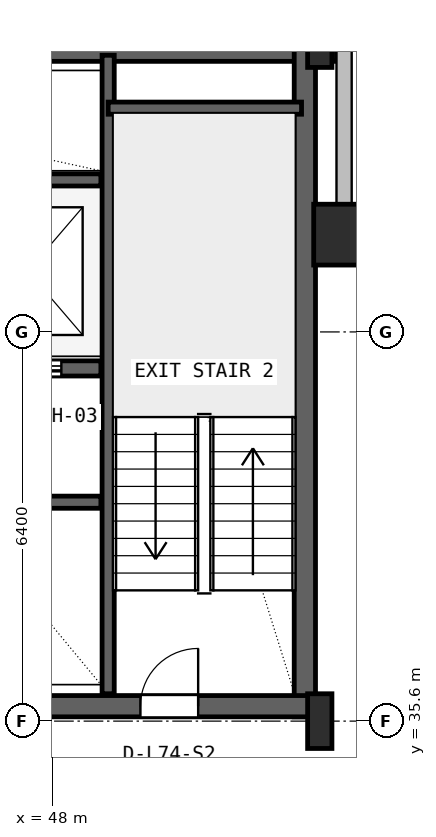
"""IFC4 building model, lengths in metres.
Left out: names, types, materials, properties, quantities, classifications, styles, units other than length and angle.
Written with IfcOpenShell. Run it as: python <this file> out.ifc"""

import sys

from ifc_helpers import new_model, si_unit, direction, frame, frame_2d, origin, origin_2d, place, context, subcontext, project, spatial, rectangle, hollow_rectangle, i_section, extrude, source, transform, mapped, element, fill, save


model = new_model("IFC4")
c1 = context("Model", 3, precision=1e-05, world=origin(), true_north=direction((0.0, 1.0)))
c2 = subcontext(c1, "Body", "Model", "MODEL_VIEW")
j1 = project(units=[si_unit("LENGTHUNIT", "METRE"), si_unit("PLANEANGLEUNIT", "RADIAN")], contexts=[c1])
p1 = place(None, origin())
s1 = spatial("IfcSite", under=j1, at=p1, CompositionType="ELEMENT")
p2 = place(p1, origin())
s2 = spatial("IfcBuilding", under=s1, at=p2, CompositionType="ELEMENT")
p3 = place(p2, frame((0.0, 0.0, 296.4)))
s3 = spatial("IfcBuildingStorey", under=s2, at=p3, CompositionType="ELEMENT", Elevation=296.4)
p4 = place(p3, frame((15.325, 46.625, 0.0), z_axis=(0.0, 0.0, 1.0), x_axis=(1.0, 0.0, 0.0)))
e1 = element("IfcWall", 1, at=p4, inside=s3, PredefinedType="SHEAR", context=c2, shape_type="SweptSolid", body=[
    extrude(rectangle(XDim=37.35, YDim=0.35, at=frame_2d((18.675, 0.0))), origin(), (0.0, 0.0, 1.0), 3.52),
])
p5 = place(p3, frame((52.155, 35.67, 0.0), z_axis=(0.0, 0.0, 1.0), x_axis=(0.0, 1.0, 0.0)))
e2 = element("IfcWall", 2, at=p5, inside=s3, PredefinedType="SHEAR", context=c2, shape_type="SweptSolid", body=[
    extrude(rectangle(XDim=11.13, YDim=0.35, at=frame_2d((5.565, 0.0))), origin(), (0.0, 0.0, 1.0), 3.52),
])
p6 = place(p3, frame((43.2, 35.845, 0.0), z_axis=(0.0, 0.0, 1.0), x_axis=(1.0, 0.0, 0.0)))
e3 = element("IfcWall", 3, at=p6, inside=s3, PredefinedType="SHEAR", context=c2, shape_type="SweptSolid", body=[
    extrude(rectangle(XDim=9.13, YDim=0.35, at=frame_2d((4.565, 0.0))), origin(), (0.0, 0.0, 1.0), 3.52),
])
p7 = place(p6, frame((6.25, 0.0, 0.0)))
e4 = element("IfcOpeningElement", 4, at=p7, cuts=e3, PredefinedType="OPENING", context=c2, shape_type="SweptSolid", body=[
    extrude(rectangle(XDim=0.95, YDim=2.1, at=frame_2d((0.475, 1.05))), frame((0.0, 0.185, 0.0), z_axis=(0.0, -1.0, 0.0), x_axis=(1.0, 0.0, 0.0)), (0.0, 0.0, 1.0), 0.37),
])
m1 = source(origin(), c2, "Body", "SweptSolid", [
    extrude(i_section(OverallWidth=0.4, OverallDepth=0.9, WebThickness=0.016, FlangeThickness=0.028, FilletRadius=0.016, at=origin_2d()), origin(), (0.0, 0.0, 1.0), 3.8),
])
for number, where, z_axis, x_axis in (
    (5, (52.4, 35.6, 0.0), (0.0, 0.0, 1.0), (1.0, 0.0, 0.0)),
    (6, (52.4, 46.8, 0.0), (0.0, 0.0, 1.0), (1.0, 0.0, 0.0)),
):
    element("IfcColumn", number, at=place(p3, frame(where, z_axis=z_axis, x_axis=x_axis)), inside=s3, PredefinedType="COLUMN", context=c2, shape_type="MappedRepresentation", body=[
        mapped(m1, transform((0.0, 0.0, 0.0), x_axis=(1.0, 0.0, 0.0), y_axis=(0.0, 1.0, 0.0), z_axis=(0.0, 0.0, 1.0), scale=1.0)),
    ])
m2 = source(origin(), c2, "Body", "SweptSolid", [
    extrude(hollow_rectangle(XDim=1.0, YDim=1.0, WallThickness=0.04, at=origin_2d()), origin(), (0.0, 0.0, 1.0), 3.8),
])
p8 = place(p3, frame((52.8, 43.6, 0.0), z_axis=(0.0, 0.0, 1.0), x_axis=(1.0, 0.0, 0.0)))
e7 = element("IfcColumn", 7, at=p8, inside=s3, PredefinedType="COLUMN", context=c2, shape_type="MappedRepresentation", body=[
    mapped(m2, transform((0.0, 0.0, 0.0), x_axis=(1.0, 0.0, 0.0), y_axis=(0.0, 1.0, 0.0), z_axis=(0.0, 0.0, 1.0), scale=1.0)),
])
p9 = place(p3, frame((52.93, 43.6, 0.0), z_axis=(0.0, 0.0, 1.0), x_axis=(1.0, 0.0, 0.0)))
e8 = element("IfcWall", 8, at=p9, inside=s3, PredefinedType="SOLIDWALL", context=c2, shape_type="SweptSolid", body=[
    extrude(rectangle(XDim=2.99, YDim=0.25, at=frame_2d((1.495, 0.0))), origin(), (0.0, 0.0, 1.0), 3.5),
])
p10 = place(p3, frame((52.8, 43.52, 0.0), z_axis=(0.0, 0.0, 1.0), x_axis=(0.0, 1.0, 0.0)))
e9 = element("IfcWall", 9, at=p10, inside=s3, PredefinedType="SOLIDWALL", context=c2, shape_type="SweptSolid", body=[
    extrude(rectangle(XDim=3.2, YDim=0.25, at=frame_2d((1.6, 0.0))), origin(), (0.0, 0.0, 1.0), 3.141),
])
p11 = place(p3, frame((48.92, 36.05, 0.0), z_axis=(0.0, 0.0, 1.0), x_axis=(0.0, 1.0, 0.0)))
e10 = element("IfcWall", 10, at=p11, inside=s3, PredefinedType="SHEAR", context=c2, shape_type="SweptSolid", body=[
    extrude(rectangle(XDim=10.5, YDim=0.2, at=frame_2d((5.25, 0.0))), origin(), (0.0, 0.0, 1.0), 3.52),
])
p12 = place(p3, frame((48.92, 45.68, 0.0), z_axis=(0.0, 0.0, 1.0), x_axis=(1.0, 0.0, 0.0)))
e11 = element("IfcWall", 11, at=p12, inside=s3, PredefinedType="SHEAR", context=c2, shape_type="SweptSolid", body=[
    extrude(rectangle(XDim=3.18, YDim=0.2, at=frame_2d((1.59, 0.0))), origin(), (0.0, 0.0, 1.0), 3.52),
])
p13 = place(p3, frame((24.98, 41.4, 0.0), z_axis=(0.0, 0.0, 1.0), x_axis=(1.0, 0.0, 0.0)))
e12 = element("IfcWall", 12, at=p13, inside=s3, PredefinedType="SHEAR", context=c2, shape_type="SweptSolid", body=[
    extrude(rectangle(XDim=23.82, YDim=0.25, at=frame_2d((11.91, 0.0))), origin(), (0.0, 0.0, 1.0), 3.52),
])
p14 = place(p13, frame((16.87, 0.0, 0.0)))
e13 = element("IfcOpeningElement", 13, at=p14, cuts=e12, PredefinedType="OPENING", context=c2, shape_type="SweptSolid", body=[
    extrude(rectangle(XDim=1.1, YDim=2.18, at=frame_2d((0.55, 1.09))), frame((0.0, 0.135, 0.0), z_axis=(0.0, -1.0, 0.0), x_axis=(1.0, 0.0, 0.0)), (0.0, 0.0, 1.0), 0.27),
])
p15 = place(p13, frame((19.47, 0.0, 0.0)))
e14 = element("IfcOpeningElement", 14, at=p15, cuts=e12, PredefinedType="OPENING", context=c2, shape_type="SweptSolid", body=[
    extrude(rectangle(XDim=1.1, YDim=2.18, at=frame_2d((0.55, 1.09))), frame((0.0, 0.135, 0.0), z_axis=(0.0, -1.0, 0.0), x_axis=(1.0, 0.0, 0.0)), (0.0, 0.0, 1.0), 0.27),
])
p16 = place(p13, frame((22.07, 0.0, 0.0)))
e15 = element("IfcOpeningElement", 15, at=p16, cuts=e12, PredefinedType="OPENING", context=c2, shape_type="SweptSolid", body=[
    extrude(rectangle(XDim=1.1, YDim=2.18, at=frame_2d((0.55, 1.09))), frame((0.0, 0.135, 0.0), z_axis=(0.0, -1.0, 0.0), x_axis=(1.0, 0.0, 0.0)), (0.0, 0.0, 1.0), 0.27),
])
p17 = place(p13, frame((1.81, 0.0, 0.0)))
e16 = element("IfcOpeningElement", 16, at=p17, cuts=e12, PredefinedType="OPENING", context=c2, shape_type="SweptSolid", body=[
    extrude(rectangle(XDim=0.92, YDim=2.08, at=frame_2d((0.46, 1.04))), frame((0.0, 0.135, 0.0), z_axis=(0.0, -1.0, 0.0), x_axis=(1.0, 0.0, 0.0)), (0.0, 0.0, 1.0), 0.27),
])
p18 = place(p13, frame((5.71, 0.0, 0.0)))
e17 = element("IfcOpeningElement", 17, at=p18, cuts=e12, PredefinedType="OPENING", context=c2, shape_type="SweptSolid", body=[
    extrude(rectangle(XDim=0.92, YDim=2.08, at=frame_2d((0.46, 1.04))), frame((0.0, 0.135, 0.0), z_axis=(0.0, -1.0, 0.0), x_axis=(1.0, 0.0, 0.0)), (0.0, 0.0, 1.0), 0.27),
])
p19 = place(p13, frame((9.21, 0.0, 0.0)))
e18 = element("IfcOpeningElement", 18, at=p19, cuts=e12, PredefinedType="OPENING", context=c2, shape_type="SweptSolid", body=[
    extrude(rectangle(XDim=0.92, YDim=2.08, at=frame_2d((0.46, 1.04))), frame((0.0, 0.135, 0.0), z_axis=(0.0, -1.0, 0.0), x_axis=(1.0, 0.0, 0.0)), (0.0, 0.0, 1.0), 0.27),
])
p20 = place(p13, frame((11.96, 0.0, 0.0)))
e19 = element("IfcOpeningElement", 19, at=p20, cuts=e12, PredefinedType="OPENING", context=c2, shape_type="SweptSolid", body=[
    extrude(rectangle(XDim=0.92, YDim=2.08, at=frame_2d((0.46, 1.04))), frame((0.0, 0.135, 0.0), z_axis=(0.0, -1.0, 0.0), x_axis=(1.0, 0.0, 0.0)), (0.0, 0.0, 1.0), 0.27),
])
p21 = place(p13, frame((14.31, 0.0, 0.0)))
e20 = element("IfcOpeningElement", 20, at=p21, cuts=e12, PredefinedType="OPENING", context=c2, shape_type="SweptSolid", body=[
    extrude(rectangle(XDim=0.92, YDim=2.08, at=frame_2d((0.46, 1.04))), frame((0.0, 0.135, 0.0), z_axis=(0.0, -1.0, 0.0), x_axis=(1.0, 0.0, 0.0)), (0.0, 0.0, 1.0), 0.27),
])
p22 = place(p3, frame((41.22, 44.5, 0.0), z_axis=(0.0, 0.0, 1.0), x_axis=(1.0, 0.0, 0.0)))
e21 = element("IfcWall", 21, at=p22, inside=s3, PredefinedType="SHEAR", context=c2, shape_type="SweptSolid", body=[
    extrude(rectangle(XDim=7.58, YDim=0.2, at=frame_2d((3.79, 0.0))), origin(), (0.0, 0.0, 1.0), 3.52),
])
p23 = place(p3, frame((43.65, 39.2, 0.0), z_axis=(0.0, 0.0, 1.0), x_axis=(1.0, 0.0, 0.0)))
e22 = element("IfcWall", 22, at=p23, inside=s3, PredefinedType="SHEAR", context=c2, shape_type="SweptSolid", body=[
    extrude(rectangle(XDim=5.15, YDim=0.2, at=frame_2d((2.575, 0.0))), origin(), (0.0, 0.0, 1.0), 3.52),
])
m3 = source(origin(), c2, "Body", "SweptSolid", [
    extrude(rectangle(XDim=0.95, YDim=2.1, at=frame_2d((0.475, 1.05))), frame((0.0, 0.025, 0.0), z_axis=(0.0, -1.0, 0.0), x_axis=(1.0, 0.0, 0.0)), (0.0, 0.0, 1.0), 0.05),
])
p24 = place(p7, origin())
e23 = element("IfcDoor", 23, at=p24, inside=s3, OperationType="SINGLE_SWING_RIGHT", PredefinedType="DOOR", context=c2, shape_type="MappedRepresentation", body=[
    mapped(m3, transform((0.0, 0.0, 0.0), x_axis=(1.0, 0.0, 0.0), y_axis=(0.0, 1.0, 0.0), z_axis=(0.0, 0.0, 1.0), scale=1.0)),
])
fill(e4, e23)
m4 = source(origin(), c2, "Body", "SweptSolid", [
    extrude(rectangle(XDim=1.1, YDim=2.18, at=frame_2d((0.55, 1.09))), frame((0.0, 0.025, 0.0), z_axis=(0.0, -1.0, 0.0), x_axis=(1.0, 0.0, 0.0)), (0.0, 0.0, 1.0), 0.05),
])
p25 = place(p16, frame((1.1, 0.0, 0.0), z_axis=(0.0, 0.0, 1.0), x_axis=(-1.0, 0.0, 0.0)))
e24 = element("IfcDoor", 24, at=p25, inside=s3, OperationType="SLIDING_TO_LEFT", PredefinedType="DOOR", context=c2, shape_type="MappedRepresentation", body=[
    mapped(m4, transform((0.0, 0.0, 0.0), x_axis=(1.0, 0.0, 0.0), y_axis=(0.0, 1.0, 0.0), z_axis=(0.0, 0.0, 1.0), scale=1.0)),
])
fill(e15, e24)
save(model, sys.argv[1])
